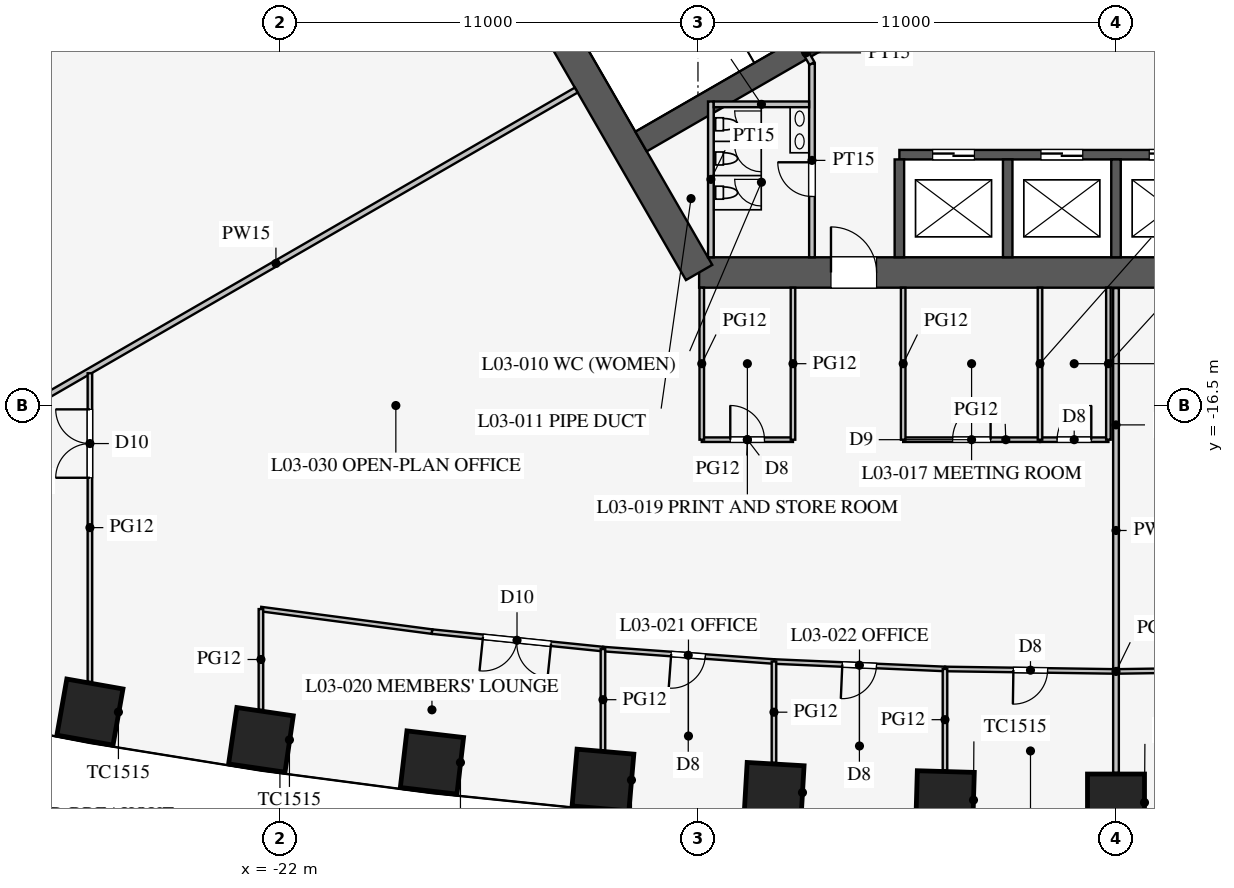
"""IFC4 building model, lengths in metres.
Left out: names, types, materials, properties, quantities, classifications, styles, units other than length and angle.
Written with IfcOpenShell. Run it as: python <this file> out.ifc"""

import sys

from ifc_helpers import new_model, si_unit, direction, frame, frame_2d, origin, origin_2d, place, context, subcontext, project, spatial, rectangle, extrude, element, fill, save


model = new_model("IFC4")
c1 = context("Model", 3, precision=1e-05, world=origin(), true_north=direction((0.0, 1.0)))
c2 = subcontext(c1, "Body", "Model", "MODEL_VIEW")
j1 = project(units=[si_unit("LENGTHUNIT", "METRE"), si_unit("PLANEANGLEUNIT", "RADIAN")], contexts=[c1])
p1 = place(None, origin())
s1 = spatial("IfcSite", under=j1, at=p1, CompositionType="ELEMENT")
p2 = place(p1, origin())
s2 = spatial("IfcBuilding", under=s1, at=p2, CompositionType="ELEMENT")
p3 = place(p2, frame((0.0, 0.0, 16.5)))
s3 = spatial("IfcBuildingStorey", under=s2, at=p3, CompositionType="ELEMENT", Elevation=16.5)
for number, where, z_axis, x_axis in (
    (1, (-27.0, -24.568, 0.0), (0.0, 0.0, 1.0), (0.985, -0.174, 0.0)),
    (2, (-22.5, -25.299, 0.0), (0.0, 0.0, 1.0), (0.989, -0.145, 0.0)),
    (3, (-18.0, -25.895, 0.0), (0.0, 0.0, 1.0), (0.993, -0.116, 0.0)),
    (4, (-13.5, -26.357, 0.0), (0.0, 0.0, 1.0), (0.996, -0.087, 0.0)),
    (5, (-9.0, -26.686, 0.0), (0.0, 0.0, 1.0), (0.998, -0.058, 0.0)),
    (6, (-4.5, -26.883, 0.0), (0.0, 0.0, 1.0), (1.0, -0.029, 0.0)),
    (7, (0.0, -26.949, 0.0), (0.0, 0.0, 1.0), (1.0, 0.0, 0.0)),
):
    element("IfcColumn", number, at=place(p3, frame(where, z_axis=z_axis, x_axis=x_axis)), inside=s3, PredefinedType="COLUMN", context=c2, shape_type="SweptSolid", body=[
        extrude(rectangle(XDim=1.5, YDim=1.5, at=origin_2d()), origin(), (0.0, 0.0, 1.0), 4.2),
    ])
p4 = place(p3, frame((-10.97, -13.0, 0.0), z_axis=(0.0, 0.0, 1.0), x_axis=(1.0, 0.0, 0.0)))
e8 = element("IfcWall", 8, at=p4, inside=s3, PredefinedType="SHEAR", context=c2, shape_type="SweptSolid", body=[
    extrude(rectangle(XDim=21.939, YDim=0.8, at=frame_2d((10.97, 0.0))), origin(), (0.0, 0.0, 1.0), 4.2),
])
p5 = place(p4, frame((17.27, 0.0, 0.0)))
e9 = element("IfcOpeningElement", 9, at=p5, cuts=e8, PredefinedType="OPENING", context=c2, shape_type="SweptSolid", body=[
    extrude(rectangle(XDim=1.2, YDim=2.1, at=frame_2d((0.6, 1.05))), frame((0.0, 0.41, 0.0), z_axis=(0.0, -1.0, 0.0), x_axis=(1.0, 0.0, 0.0)), (0.0, 0.0, 1.0), 0.82),
])
p6 = place(p4, frame((3.47, 0.0, 0.0)))
e10 = element("IfcOpeningElement", 10, at=p6, cuts=e8, PredefinedType="OPENING", context=c2, shape_type="SweptSolid", body=[
    extrude(rectangle(XDim=1.2, YDim=2.1, at=frame_2d((0.6, 1.05))), frame((0.0, 0.41, 0.0), z_axis=(0.0, -1.0, 0.0), x_axis=(1.0, 0.0, 0.0)), (0.0, 0.0, 1.0), 0.82),
])
p7 = place(p3, frame((-16.743, -3.0, 0.0), z_axis=(0.0, 0.0, 1.0), x_axis=(0.499995765644, -0.866027848477, 0.0)))
e11 = element("IfcWall", 11, at=p7, inside=s3, PredefinedType="SHEAR", context=c2, shape_type="SweptSolid", body=[
    extrude(rectangle(XDim=11.547, YDim=0.8, at=frame_2d((5.773, 0.0))), origin(), (0.0, 0.0, 1.0), 4.2),
])
p8 = place(p3, frame((-5.7, -9.9, 0.0), z_axis=(0.0, 0.0, 1.0), x_axis=(1.0, 0.0, 0.0)))
e12 = element("IfcWall", 12, at=p8, inside=s3, PredefinedType="SHEAR", context=c2, shape_type="SweptSolid", body=[
    extrude(rectangle(XDim=11.4, YDim=0.25, at=frame_2d((5.7, 0.0))), origin(), (0.0, 0.0, 1.0), 4.2),
])
p9 = place(p8, frame((0.875, 0.0, 0.0)))
e13 = element("IfcOpeningElement", 13, at=p9, cuts=e12, PredefinedType="OPENING", context=c2, shape_type="SweptSolid", body=[
    extrude(rectangle(XDim=1.1, YDim=2.2, at=frame_2d((0.55, 1.1))), frame((0.0, 0.135, 0.0), z_axis=(0.0, -1.0, 0.0), x_axis=(1.0, 0.0, 0.0)), (0.0, 0.0, 1.0), 0.27),
])
p10 = place(p8, frame((3.725, 0.0, 0.0)))
e14 = element("IfcOpeningElement", 14, at=p10, cuts=e12, PredefinedType="OPENING", context=c2, shape_type="SweptSolid", body=[
    extrude(rectangle(XDim=1.1, YDim=2.2, at=frame_2d((0.55, 1.1))), frame((0.0, 0.135, 0.0), z_axis=(0.0, -1.0, 0.0), x_axis=(1.0, 0.0, 0.0)), (0.0, 0.0, 1.0), 0.27),
])
p11 = place(p8, frame((6.575, 0.0, 0.0)))
e15 = element("IfcOpeningElement", 15, at=p11, cuts=e12, PredefinedType="OPENING", context=c2, shape_type="SweptSolid", body=[
    extrude(rectangle(XDim=1.1, YDim=2.2, at=frame_2d((0.55, 1.1))), frame((0.0, 0.135, 0.0), z_axis=(0.0, -1.0, 0.0), x_axis=(1.0, 0.0, 0.0)), (0.0, 0.0, 1.0), 0.27),
])
p12 = place(p8, frame((9.425, 0.0, 0.0)))
e16 = element("IfcOpeningElement", 16, at=p12, cuts=e12, PredefinedType="OPENING", context=c2, shape_type="SweptSolid", body=[
    extrude(rectangle(XDim=1.1, YDim=2.2, at=frame_2d((0.55, 1.1))), frame((0.0, 0.135, 0.0), z_axis=(0.0, -1.0, 0.0), x_axis=(1.0, 0.0, 0.0)), (0.0, 0.0, 1.0), 0.27),
])
for number, where, z_axis, x_axis in (
    (17, (-5.7, -10.025, 0.0), (0.0, 0.0, 1.0), (0.0, -1.0, 0.0)),
    (18, (-2.85, -10.025, 0.0), (0.0, 0.0, 1.0), (0.0, -1.0, 0.0)),
    (19, (0.0, -10.025, 0.0), (0.0, 0.0, 1.0), (0.0, -1.0, 0.0)),
):
    element("IfcWall", number, at=place(p3, frame(where, z_axis=z_axis, x_axis=x_axis)), inside=s3, PredefinedType="SHEAR", context=c2, shape_type="SweptSolid", body=[
        extrude(rectangle(XDim=2.575, YDim=0.25, at=frame_2d((1.288, 0.0))), origin(), (0.0, 0.0, 1.0), 4.2),
    ])
p13 = place(p3, frame((-4.638, -5.016, 0.0), z_axis=(0.0, 0.0, 1.0), x_axis=(-0.866019375473, -0.500010441196, 0.0)))
e20 = element("IfcWall", 20, at=p13, inside=s3, PredefinedType="SHEAR", context=c2, shape_type="SweptSolid", body=[
    extrude(rectangle(XDim=9.075, YDim=0.6, at=frame_2d((4.538, 0.0))), origin(), (0.0, 0.0, 1.0), 4.2),
])
p14 = place(p3, frame((-8.0, -7.5, 0.0), z_axis=(0.0, 0.0, 1.0), x_axis=(0.0, -1.0, 0.0)))
e21 = element("IfcWall", 21, at=p14, inside=s3, PredefinedType="PARTITIONING", context=c2, shape_type="SweptSolid", body=[
    extrude(rectangle(XDim=5.1, YDim=0.15, at=frame_2d((2.55, 0.0))), origin(), (0.0, 0.0, 1.0), 4.0),
])
p15 = place(p14, frame((2.6, 0.0, 0.0)))
e22 = element("IfcOpeningElement", 22, at=p15, cuts=e21, PredefinedType="OPENING", context=c2, shape_type="SweptSolid", body=[
    extrude(rectangle(XDim=0.9, YDim=2.1, at=frame_2d((0.45, 1.05))), frame((0.0, 0.085, 0.0), z_axis=(0.0, -1.0, 0.0), x_axis=(1.0, 0.0, 0.0)), (0.0, 0.0, 1.0), 0.17),
])
p16 = place(p3, frame((-8.0, -7.5, 0.0), z_axis=(0.0, 0.0, 1.0), x_axis=(-0.499842556608, 0.866116284689, 0.0)))
e23 = element("IfcWall", 23, at=p16, inside=s3, PredefinedType="PARTITIONING", context=c2, shape_type="SweptSolid", body=[
    extrude(rectangle(XDim=0.645, YDim=0.15, at=frame_2d((0.323, 0.0))), origin(), (0.0, 0.0, 1.0), 4.0),
])
p17 = place(p3, frame((-10.66, -8.5, 0.0), z_axis=(0.0, 0.0, 1.0), x_axis=(0.0, -1.0, 0.0)))
e24 = element("IfcWall", 24, at=p17, inside=s3, PredefinedType="PARTITIONING", context=c2, shape_type="SweptSolid", body=[
    extrude(rectangle(XDim=4.1, YDim=0.15, at=frame_2d((2.05, 0.0))), origin(), (0.0, 0.0, 1.0), 4.0),
])
p18 = place(p3, frame((-8.075, -8.575, 0.0), z_axis=(0.0, 0.0, 1.0), x_axis=(-1.0, 0.0, 0.0)))
e25 = element("IfcWall", 25, at=p18, inside=s3, PredefinedType="PARTITIONING", context=c2, shape_type="SweptSolid", body=[
    extrude(rectangle(XDim=2.51, YDim=0.15, at=frame_2d((1.255, 0.0))), origin(), (0.0, 0.0, 1.0), 4.0),
])
p19 = place(p3, frame((-14.203, -8.2, 0.0), z_axis=(0.0, 0.0, 1.0), x_axis=(-0.866024965723, -0.500000758745, 0.0)))
e26 = element("IfcWall", 26, at=p19, inside=s3, PredefinedType="PARTITIONING", context=c2, shape_type="SweptSolid", body=[
    extrude(rectangle(XDim=18.25, YDim=0.15, at=frame_2d((9.125, 0.0))), origin(), (0.0, 0.0, 1.0), 2.3),
])
p20 = place(p3, frame((0.0, -13.41, 0.0), z_axis=(0.0, 0.0, 1.0), x_axis=(0.0, -1.0, 0.0)))
e27 = element("IfcWall", 27, at=p20, inside=s3, PredefinedType="PARTITIONING", context=c2, shape_type="SweptSolid", body=[
    extrude(rectangle(XDim=12.759, YDim=0.15, at=frame_2d((6.379, 0.0))), origin(), (0.0, 0.0, 1.0), 3.2),
])
p21 = place(p3, frame((-10.9, -17.4, 0.0), z_axis=(0.0, 0.0, 1.0), x_axis=(1.0, 0.0, 0.0)))
e28 = element("IfcWall", 28, at=p21, inside=s3, PredefinedType="PARTITIONING", context=c2, shape_type="SweptSolid", body=[
    extrude(rectangle(XDim=2.4, YDim=0.12, at=frame_2d((1.2, 0.0))), origin(), (0.0, 0.0, 1.0), 2.9),
])
p22 = place(p21, frame((0.75, 0.0, 0.15)))
e29 = element("IfcOpeningElement", 29, at=p22, cuts=e28, PredefinedType="OPENING", context=c2, shape_type="SweptSolid", body=[
    extrude(rectangle(XDim=0.9, YDim=2.1, at=frame_2d((0.45, 1.05))), frame((0.0, 0.07, 0.0), z_axis=(0.0, -1.0, 0.0), x_axis=(1.0, 0.0, 0.0)), (0.0, 0.0, 1.0), 0.14),
])
p23 = place(p3, frame((-2.0, -17.4, 0.0), z_axis=(0.0, 0.0, 1.0), x_axis=(1.0, 0.0, 0.0)))
e30 = element("IfcWall", 30, at=p23, inside=s3, PredefinedType="PARTITIONING", context=c2, shape_type="SweptSolid", body=[
    extrude(rectangle(XDim=1.8, YDim=0.12, at=frame_2d((0.9, 0.0))), origin(), (0.0, 0.0, 1.0), 2.9),
])
p24 = place(p23, frame((0.45, 0.0, 0.15)))
e31 = element("IfcOpeningElement", 31, at=p24, cuts=e30, PredefinedType="OPENING", context=c2, shape_type="SweptSolid", body=[
    extrude(rectangle(XDim=0.9, YDim=2.1, at=frame_2d((0.45, 1.05))), frame((0.0, 0.07, 0.0), z_axis=(0.0, -1.0, 0.0), x_axis=(1.0, 0.0, 0.0)), (0.0, 0.0, 1.0), 0.14),
])
p25 = place(p3, frame((-5.6, -17.4, 0.0), z_axis=(0.0, 0.0, 1.0), x_axis=(1.0, 0.0, 0.0)))
e32 = element("IfcWall", 32, at=p25, inside=s3, PredefinedType="PARTITIONING", context=c2, shape_type="SweptSolid", body=[
    extrude(rectangle(XDim=3.6, YDim=0.12, at=frame_2d((1.8, 0.0))), origin(), (0.0, 0.0, 1.0), 2.9),
])
p26 = place(p25, frame((1.3, 0.0, 0.15)))
e33 = element("IfcOpeningElement", 33, at=p26, cuts=e32, PredefinedType="OPENING", context=c2, shape_type="SweptSolid", body=[
    extrude(rectangle(XDim=1.0, YDim=2.1, at=frame_2d((0.5, 1.05))), frame((0.0, 0.07, 0.0), z_axis=(0.0, -1.0, 0.0), x_axis=(1.0, 0.0, 0.0)), (0.0, 0.0, 1.0), 0.14),
])
for number, where, z_axis, x_axis in (
    (34, (-0.2, -13.4, 0.0), (0.0, 0.0, 1.0), (0.0, -1.0, 0.0)),
    (35, (-10.9, -13.4, 0.0), (0.0, 0.0, 1.0), (0.0, -1.0, 0.0)),
    (36, (-2.0, -13.4, 0.0), (0.0, 0.0, 1.0), (0.0, -1.0, 0.0)),
    (37, (-5.6, -13.4, 0.0), (0.0, 0.0, 1.0), (0.0, -1.0, 0.0)),
    (38, (-8.5, -13.4, 0.0), (0.0, 0.0, 1.0), (0.0, -1.0, 0.0)),
):
    element("IfcWall", number, at=place(p3, frame(where, z_axis=z_axis, x_axis=x_axis)), inside=s3, PredefinedType="PARTITIONING", context=c2, shape_type="SweptSolid", body=[
        extrude(rectangle(XDim=4.0, YDim=0.12, at=frame_2d((2.0, 0.0))), origin(), (0.0, 0.0, 1.0), 2.9),
    ])
p27 = place(p3, frame((0.0, -23.499, 0.0), z_axis=(0.0, 0.0, 1.0), x_axis=(0.999894311967, 0.014538393859, 0.0)))
e39 = element("IfcWall", 39, at=p27, inside=s3, PredefinedType="PARTITIONING", context=c2, shape_type="SweptSolid", body=[
    extrude(rectangle(XDim=4.5, YDim=0.12, at=frame_2d((2.25, 0.0))), origin(), (0.0, 0.0, 1.0), 2.9),
])
p28 = place(p27, frame((1.8, 0.0, 0.15)))
e40 = element("IfcOpeningElement", 40, at=p28, cuts=e39, PredefinedType="OPENING", context=c2, shape_type="SweptSolid", body=[
    extrude(rectangle(XDim=0.9, YDim=2.1, at=frame_2d((0.45, 1.05))), frame((0.0, 0.07, 0.0), z_axis=(0.0, -1.0, 0.0), x_axis=(1.0, 0.0, 0.0)), (0.0, 0.0, 1.0), 0.14),
])
p29 = place(p3, frame((-13.5, -22.91, 0.0), z_axis=(0.0, 0.0, 1.0), x_axis=(0.997363894896, -0.072562119306, 0.0)))
e41 = element("IfcWall", 41, at=p29, inside=s3, PredefinedType="PARTITIONING", context=c2, shape_type="SweptSolid", body=[
    extrude(rectangle(XDim=4.512, YDim=0.12, at=frame_2d((2.256, 0.0))), origin(), (0.0, 0.0, 1.0), 2.9),
])
p30 = place(p29, frame((1.8, 0.0, 0.15)))
e42 = element("IfcOpeningElement", 42, at=p30, cuts=e41, PredefinedType="OPENING", context=c2, shape_type="SweptSolid", body=[
    extrude(rectangle(XDim=0.9, YDim=2.1, at=frame_2d((0.45, 1.05))), frame((0.0, 0.07, 0.0), z_axis=(0.0, -1.0, 0.0), x_axis=(1.0, 0.0, 0.0)), (0.0, 0.0, 1.0), 0.14),
])
p31 = place(p3, frame((-18.0, -22.451, 0.0), z_axis=(0.0, 0.0, 1.0), x_axis=(0.994833141332, -0.101523499286, 0.0)))
e43 = element("IfcWall", 43, at=p31, inside=s3, PredefinedType="PARTITIONING", context=c2, shape_type="SweptSolid", body=[
    extrude(rectangle(XDim=4.523, YDim=0.12, at=frame_2d((2.262, 0.0))), origin(), (0.0, 0.0, 1.0), 2.9),
])
p32 = place(p31, frame((1.35, 0.0, 0.15)))
e44 = element("IfcOpeningElement", 44, at=p32, cuts=e43, PredefinedType="OPENING", context=c2, shape_type="SweptSolid", body=[
    extrude(rectangle(XDim=1.8, YDim=2.1, at=frame_2d((0.9, 1.05))), frame((0.0, 0.07, 0.0), z_axis=(0.0, -1.0, 0.0), x_axis=(1.0, 0.0, 0.0)), (0.0, 0.0, 1.0), 0.14),
])
p33 = place(p3, frame((-22.5, -21.858, 0.0), z_axis=(0.0, 0.0, 1.0), x_axis=(0.991435244698, -0.130599217346, 0.0)))
e45 = element("IfcWall", 45, at=p33, inside=s3, PredefinedType="PARTITIONING", context=c2, shape_type="SweptSolid", body=[
    extrude(rectangle(XDim=4.539, YDim=0.12, at=frame_2d((2.27, 0.0))), origin(), (0.0, 0.0, 1.0), 2.9),
])
p34 = place(p3, frame((-4.5, -23.433, 0.0), z_axis=(0.0, 0.0, 1.0), x_axis=(0.999894311967, -0.014538393859, 0.0)))
e46 = element("IfcWall", 46, at=p34, inside=s3, PredefinedType="PARTITIONING", context=c2, shape_type="SweptSolid", body=[
    extrude(rectangle(XDim=4.5, YDim=0.12, at=frame_2d((2.25, 0.0))), origin(), (0.0, 0.0, 1.0), 2.9),
])
p35 = place(p34, frame((1.8, 0.0, 0.15)))
e47 = element("IfcOpeningElement", 47, at=p35, cuts=e46, PredefinedType="OPENING", context=c2, shape_type="SweptSolid", body=[
    extrude(rectangle(XDim=0.9, YDim=2.1, at=frame_2d((0.45, 1.05))), frame((0.0, 0.07, 0.0), z_axis=(0.0, -1.0, 0.0), x_axis=(1.0, 0.0, 0.0)), (0.0, 0.0, 1.0), 0.14),
])
p36 = place(p3, frame((-9.0, -23.237, 0.0), z_axis=(0.0, 0.0, 1.0), x_axis=(0.999052370647, -0.043524254212, 0.0)))
e48 = element("IfcWall", 48, at=p36, inside=s3, PredefinedType="PARTITIONING", context=c2, shape_type="SweptSolid", body=[
    extrude(rectangle(XDim=4.504, YDim=0.12, at=frame_2d((2.252, 0.0))), origin(), (0.0, 0.0, 1.0), 2.9),
])
p37 = place(p36, frame((1.8, 0.0, 0.15)))
e49 = element("IfcOpeningElement", 49, at=p37, cuts=e48, PredefinedType="OPENING", context=c2, shape_type="SweptSolid", body=[
    extrude(rectangle(XDim=0.9, YDim=2.1, at=frame_2d((0.45, 1.05))), frame((0.0, 0.07, 0.0), z_axis=(0.0, -1.0, 0.0), x_axis=(1.0, 0.0, 0.0)), (0.0, 0.0, 1.0), 0.14),
])
p38 = place(p3, frame((-13.5, -22.91, 0.0), z_axis=(0.0, 0.0, 1.0), x_axis=(0.0, -1.0, 0.0)))
e50 = element("IfcWall", 50, at=p38, inside=s3, PredefinedType="PARTITIONING", context=c2, shape_type="SweptSolid", body=[
    extrude(rectangle(XDim=2.664, YDim=0.12, at=frame_2d((1.332, 0.0))), origin(), (0.0, 0.0, 1.0), 2.9),
])
p39 = place(p3, frame((-22.5, -21.858, 0.0), z_axis=(0.0, 0.0, 1.0), x_axis=(0.0, -1.0, 0.0)))
e51 = element("IfcWall", 51, at=p39, inside=s3, PredefinedType="PARTITIONING", context=c2, shape_type="SweptSolid", body=[
    extrude(rectangle(XDim=2.653, YDim=0.12, at=frame_2d((1.327, 0.0))), origin(), (0.0, 0.0, 1.0), 2.9),
])
p40 = place(p3, frame((-27.0, -15.652, 0.0), z_axis=(0.0, 0.0, 1.0), x_axis=(0.0, -1.0, 0.0)))
e52 = element("IfcWall", 52, at=p40, inside=s3, PredefinedType="PARTITIONING", context=c2, shape_type="SweptSolid", body=[
    extrude(rectangle(XDim=8.124, YDim=0.12, at=frame_2d((4.062, 0.0))), origin(), (0.0, 0.0, 1.0), 2.9),
])
p41 = place(p40, frame((0.95, 0.0, 0.15)))
e53 = element("IfcOpeningElement", 53, at=p41, cuts=e52, PredefinedType="OPENING", context=c2, shape_type="SweptSolid", body=[
    extrude(rectangle(XDim=1.8, YDim=2.1, at=frame_2d((0.9, 1.05))), frame((0.0, 0.07, 0.0), z_axis=(0.0, -1.0, 0.0), x_axis=(1.0, 0.0, 0.0)), (0.0, 0.0, 1.0), 0.14),
])
p42 = place(p3, frame((-4.5, -23.433, 0.0), z_axis=(0.0, 0.0, 1.0), x_axis=(0.0, -1.0, 0.0)))
e54 = element("IfcWall", 54, at=p42, inside=s3, PredefinedType="PARTITIONING", context=c2, shape_type="SweptSolid", body=[
    extrude(rectangle(XDim=2.669, YDim=0.12, at=frame_2d((1.335, 0.0))), origin(), (0.0, 0.0, 1.0), 2.9),
])
p43 = place(p3, frame((-9.0, -23.237, 0.0), z_axis=(0.0, 0.0, 1.0), x_axis=(0.0, -1.0, 0.0)))
e55 = element("IfcWall", 55, at=p43, inside=s3, PredefinedType="PARTITIONING", context=c2, shape_type="SweptSolid", body=[
    extrude(rectangle(XDim=2.667, YDim=0.12, at=frame_2d((1.334, 0.0))), origin(), (0.0, 0.0, 1.0), 2.9),
])
p44 = place(p15, frame((0.9, 0.0, 0.0), z_axis=(0.0, 0.0, 1.0), x_axis=(-1.0, 0.0, 0.0)))
e56 = element("IfcDoor", 56, at=p44, inside=s3, OperationType="SINGLE_SWING_RIGHT", PredefinedType="DOOR", context=c2, shape_type="SweptSolid", body=[
    extrude(rectangle(XDim=0.9, YDim=2.1, at=frame_2d((0.45, 1.05))), frame((0.0, 0.025, 0.0), z_axis=(0.0, -1.0, 0.0), x_axis=(1.0, 0.0, 0.0)), (0.0, 0.0, 1.0), 0.05),
])
fill(e22, e56)
p45 = place(p6, origin())
e57 = element("IfcDoor", 57, at=p45, inside=s3, OperationType="SINGLE_SWING_LEFT", PredefinedType="DOOR", context=c2, shape_type="SweptSolid", body=[
    extrude(rectangle(XDim=1.2, YDim=2.1, at=frame_2d((0.6, 1.05))), frame((0.0, 0.025, 0.0), z_axis=(0.0, -1.0, 0.0), x_axis=(1.0, 0.0, 0.0)), (0.0, 0.0, 1.0), 0.05),
])
fill(e10, e57)
p46 = place(p41, frame((1.8, 0.0, 0.0), z_axis=(0.0, 0.0, 1.0), x_axis=(-1.0, 0.0, 0.0)))
e58 = element("IfcDoor", 58, at=p46, inside=s3, OperationType="DOUBLE_DOOR_SINGLE_SWING", PredefinedType="DOOR", context=c2, shape_type="SweptSolid", body=[
    extrude(rectangle(XDim=1.8, YDim=2.1, at=frame_2d((0.9, 1.05))), frame((0.0, 0.025, 0.0), z_axis=(0.0, -1.0, 0.0), x_axis=(1.0, 0.0, 0.0)), (0.0, 0.0, 1.0), 0.05),
])
fill(e53, e58)
p47 = place(p26, origin())
e59 = element("IfcDoor", 59, at=p47, inside=s3, OperationType="SINGLE_SWING_RIGHT", PredefinedType="DOOR", context=c2, shape_type="SweptSolid", body=[
    extrude(rectangle(XDim=1.0, YDim=2.1, at=frame_2d((0.5, 1.05))), frame((0.0, 0.025, 0.0), z_axis=(0.0, -1.0, 0.0), x_axis=(1.0, 0.0, 0.0)), (0.0, 0.0, 1.0), 0.05),
])
fill(e33, e59)
p48 = place(p24, origin())
e60 = element("IfcDoor", 60, at=p48, inside=s3, OperationType="SINGLE_SWING_RIGHT", PredefinedType="DOOR", context=c2, shape_type="SweptSolid", body=[
    extrude(rectangle(XDim=0.9, YDim=2.1, at=frame_2d((0.45, 1.05))), frame((0.0, 0.025, 0.0), z_axis=(0.0, -1.0, 0.0), x_axis=(1.0, 0.0, 0.0)), (0.0, 0.0, 1.0), 0.05),
])
fill(e31, e60)
p49 = place(p22, origin())
e61 = element("IfcDoor", 61, at=p49, inside=s3, OperationType="SINGLE_SWING_LEFT", PredefinedType="DOOR", context=c2, shape_type="SweptSolid", body=[
    extrude(rectangle(XDim=0.9, YDim=2.1, at=frame_2d((0.45, 1.05))), frame((0.0, 0.025, 0.0), z_axis=(0.0, -1.0, 0.0), x_axis=(1.0, 0.0, 0.0)), (0.0, 0.0, 1.0), 0.05),
])
fill(e29, e61)
p50 = place(p32, frame((1.8, 0.0, 0.0), z_axis=(0.0, 0.0, 1.0), x_axis=(-1.0, 0.0, 0.0)))
e62 = element("IfcDoor", 62, at=p50, inside=s3, OperationType="DOUBLE_DOOR_SINGLE_SWING", PredefinedType="DOOR", context=c2, shape_type="SweptSolid", body=[
    extrude(rectangle(XDim=1.8, YDim=2.1, at=frame_2d((0.9, 1.05))), frame((0.0, 0.025, 0.0), z_axis=(0.0, -1.0, 0.0), x_axis=(1.0, 0.0, 0.0)), (0.0, 0.0, 1.0), 0.05),
])
fill(e44, e62)
p51 = place(p30, frame((0.9, 0.0, 0.0), z_axis=(0.0, 0.0, 1.0), x_axis=(-1.0, 0.0, 0.0)))
e63 = element("IfcDoor", 63, at=p51, inside=s3, OperationType="SINGLE_SWING_RIGHT", PredefinedType="DOOR", context=c2, shape_type="SweptSolid", body=[
    extrude(rectangle(XDim=0.9, YDim=2.1, at=frame_2d((0.45, 1.05))), frame((0.0, 0.025, 0.0), z_axis=(0.0, -1.0, 0.0), x_axis=(1.0, 0.0, 0.0)), (0.0, 0.0, 1.0), 0.05),
])
fill(e42, e63)
p52 = place(p37, frame((0.9, 0.0, 0.0), z_axis=(0.0, 0.0, 1.0), x_axis=(-1.0, 0.0, 0.0)))
e64 = element("IfcDoor", 64, at=p52, inside=s3, OperationType="SINGLE_SWING_RIGHT", PredefinedType="DOOR", context=c2, shape_type="SweptSolid", body=[
    extrude(rectangle(XDim=0.9, YDim=2.1, at=frame_2d((0.45, 1.05))), frame((0.0, 0.025, 0.0), z_axis=(0.0, -1.0, 0.0), x_axis=(1.0, 0.0, 0.0)), (0.0, 0.0, 1.0), 0.05),
])
fill(e49, e64)
p53 = place(p35, frame((0.9, 0.0, 0.0), z_axis=(0.0, 0.0, 1.0), x_axis=(-1.0, 0.0, 0.0)))
e65 = element("IfcDoor", 65, at=p53, inside=s3, OperationType="SINGLE_SWING_RIGHT", PredefinedType="DOOR", context=c2, shape_type="SweptSolid", body=[
    extrude(rectangle(XDim=0.9, YDim=2.1, at=frame_2d((0.45, 1.05))), frame((0.0, 0.025, 0.0), z_axis=(0.0, -1.0, 0.0), x_axis=(1.0, 0.0, 0.0)), (0.0, 0.0, 1.0), 0.05),
])
fill(e47, e65)
p54 = place(p9, origin())
e66 = element("IfcDoor", 66, at=p54, inside=s3, OperationType="DOUBLE_DOOR_SLIDING", PredefinedType="DOOR", context=c2, shape_type="SweptSolid", body=[
    extrude(rectangle(XDim=1.1, YDim=2.2, at=frame_2d((0.55, 1.1))), frame((0.0, 0.025, 0.0), z_axis=(0.0, -1.0, 0.0), x_axis=(1.0, 0.0, 0.0)), (0.0, 0.0, 1.0), 0.05),
])
fill(e13, e66)
p55 = place(p10, origin())
e67 = element("IfcDoor", 67, at=p55, inside=s3, OperationType="DOUBLE_DOOR_SLIDING", PredefinedType="DOOR", context=c2, shape_type="SweptSolid", body=[
    extrude(rectangle(XDim=1.1, YDim=2.2, at=frame_2d((0.55, 1.1))), frame((0.0, 0.025, 0.0), z_axis=(0.0, -1.0, 0.0), x_axis=(1.0, 0.0, 0.0)), (0.0, 0.0, 1.0), 0.05),
])
fill(e14, e67)
p56 = place(p11, origin())
e68 = element("IfcDoor", 68, at=p56, inside=s3, OperationType="DOUBLE_DOOR_SLIDING", PredefinedType="DOOR", context=c2, shape_type="SweptSolid", body=[
    extrude(rectangle(XDim=1.1, YDim=2.2, at=frame_2d((0.55, 1.1))), frame((0.0, 0.025, 0.0), z_axis=(0.0, -1.0, 0.0), x_axis=(1.0, 0.0, 0.0)), (0.0, 0.0, 1.0), 0.05),
])
fill(e15, e68)
save(model, sys.argv[1])
